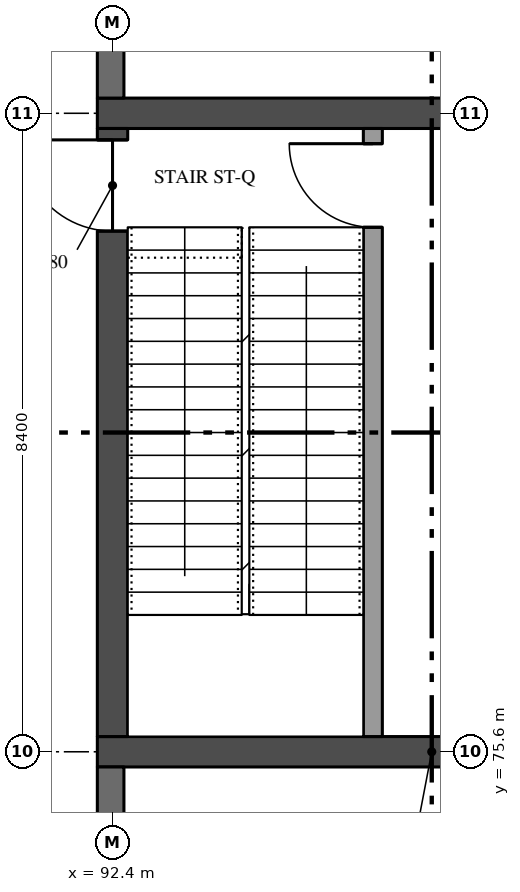
"""IFC4 building model, lengths in metres.
Left out: names, types, materials, properties, quantities, classifications, styles, units other than length and angle.
Written with IfcOpenShell. Run it as: python <this file> out.ifc"""

import sys

from ifc_helpers import new_model, si_unit, direction, frame, frame_2d, origin, place, context, subcontext, project, spatial, rectangle, extrude, element, fill, save


model = new_model("IFC4")
c1 = context("Model", 3, precision=1e-05, world=origin(), true_north=direction((0.0, 1.0)))
c2 = subcontext(c1, "Body", "Model", "MODEL_VIEW")
j1 = project(units=[si_unit("LENGTHUNIT", "METRE"), si_unit("PLANEANGLEUNIT", "RADIAN")], contexts=[c1])
p1 = place(None, origin())
s1 = spatial("IfcSite", under=j1, at=p1, CompositionType="ELEMENT")
p2 = place(p1, origin())
s2 = spatial("IfcBuilding", under=s1, at=p2, CompositionType="ELEMENT")
p3 = place(p2, origin())
s3 = spatial("IfcBuildingStorey", under=s2, at=p3, CompositionType="ELEMENT", Elevation=0.0)
for number, where, z_axis, x_axis in (
    (1, (92.2, 75.6, 0.0), (0.0, 0.0, 1.0), (1.0, 0.0, 0.0)),
    (2, (92.2, 84.0, 0.0), (0.0, 0.0, 1.0), (1.0, 0.0, 0.0)),
):
    element("IfcWall", number, at=place(p3, frame(where, z_axis=z_axis, x_axis=x_axis)), inside=s3, PredefinedType="SHEAR", context=c2, shape_type="SweptSolid", body=[
        extrude(rectangle(XDim=8.8, YDim=0.4, at=frame_2d((4.4, 0.0))), origin(), (0.0, 0.0, 1.0), 5.05),
    ])
p4 = place(p3, frame((92.4, 75.8, 0.0), z_axis=(0.0, 0.0, 1.0), x_axis=(0.0, 1.0, 0.0)))
e3 = element("IfcWall", 3, at=p4, inside=s3, PredefinedType="SHEAR", context=c2, shape_type="SweptSolid", body=[
    extrude(rectangle(XDim=8.0, YDim=0.4, at=frame_2d((4.0, 0.0))), origin(), (0.0, 0.0, 1.0), 5.05),
])
p5 = place(p4, frame((6.65, 0.0, 0.0)))
e4 = element("IfcOpeningElement", 4, at=p5, cuts=e3, PredefinedType="OPENING", context=c2, shape_type="SweptSolid", body=[
    extrude(rectangle(XDim=1.2, YDim=2.1, at=frame_2d((0.6, 1.05))), frame((0.0, 0.21, 0.0), z_axis=(0.0, -1.0, 0.0), x_axis=(1.0, 0.0, 0.0)), (0.0, 0.0, 1.0), 0.42),
])
p6 = place(p3, frame((95.825, 83.8, 0.0), z_axis=(0.0, 0.0, 1.0), x_axis=(0.0, -1.0, 0.0)))
e5 = element("IfcWall", 5, at=p6, inside=s3, PredefinedType="SOLIDWALL", context=c2, shape_type="SweptSolid", body=[
    extrude(rectangle(XDim=8.0, YDim=0.25, at=frame_2d((4.0, 0.0))), origin(), (0.0, 0.0, 1.0), 5.05),
])
p7 = place(p6, frame((0.2, 0.0, 0.0)))
e6 = element("IfcOpeningElement", 6, at=p7, cuts=e5, PredefinedType="OPENING", context=c2, shape_type="SweptSolid", body=[
    extrude(rectangle(XDim=1.1, YDim=2.1, at=frame_2d((0.55, 1.05))), frame((0.0, 0.135, 0.0), z_axis=(0.0, -1.0, 0.0), x_axis=(1.0, 0.0, 0.0)), (0.0, 0.0, 1.0), 0.27),
])
p8 = place(p3, frame((92.375, 92.02, 0.0), z_axis=(0.0, 0.0, 1.0), x_axis=(0.0, -1.0, 0.0)))
e7 = element("IfcWall", 7, at=p8, inside=s3, PredefinedType="SOLIDWALL", context=c2, shape_type="SweptSolid", body=[
    extrude(rectangle(XDim=7.82, YDim=0.35, at=frame_2d((3.91, 0.0))), origin(), (0.0, 0.0, 1.0), 5.05),
])
p9 = place(p3, frame((92.375, 75.4, 0.0), z_axis=(0.0, 0.0, 1.0), x_axis=(0.0, -1.0, 0.0)))
e8 = element("IfcWall", 8, at=p9, inside=s3, PredefinedType="SOLIDWALL", context=c2, shape_type="SweptSolid", body=[
    extrude(rectangle(XDim=8.0, YDim=0.35, at=frame_2d((4.0, 0.0))), origin(), (0.0, 0.0, 1.0), 5.05),
])
p10 = place(p9, frame((6.7, 0.0, 1.5)))
e9 = element("IfcOpeningElement", 9, at=p10, cuts=e8, PredefinedType="OPENING", context=c2, shape_type="SweptSolid", body=[
    extrude(rectangle(XDim=0.9, YDim=1.2, at=frame_2d((0.45, 0.6))), frame((0.0, 0.185, 0.0), z_axis=(0.0, -1.0, 0.0), x_axis=(1.0, 0.0, 0.0)), (0.0, 0.0, 1.0), 0.37),
])
p11 = place(p7, frame((1.1, 0.0, 0.0), z_axis=(0.0, 0.0, 1.0), x_axis=(-1.0, 0.0, 0.0)))
e10 = element("IfcDoor", 10, at=p11, inside=s3, OperationType="SINGLE_SWING_LEFT", PredefinedType="DOOR", context=c2, shape_type="SweptSolid", body=[
    extrude(rectangle(XDim=1.1, YDim=2.1, at=frame_2d((0.55, 1.05))), frame((0.0, 0.035, 0.0), z_axis=(0.0, -1.0, 0.0), x_axis=(1.0, 0.0, 0.0)), (0.0, 0.0, 1.0), 0.07),
])
fill(e6, e10)
p12 = place(p5, origin())
e11 = element("IfcDoor", 11, at=p12, inside=s3, OperationType="SINGLE_SWING_LEFT", PredefinedType="DOOR", context=c2, shape_type="SweptSolid", body=[
    extrude(rectangle(XDim=1.2, YDim=2.1, at=frame_2d((0.6, 1.05))), frame((0.0, 0.035, 0.0), z_axis=(0.0, -1.0, 0.0), x_axis=(1.0, 0.0, 0.0)), (0.0, 0.0, 1.0), 0.07),
])
fill(e4, e11)
save(model, sys.argv[1])
